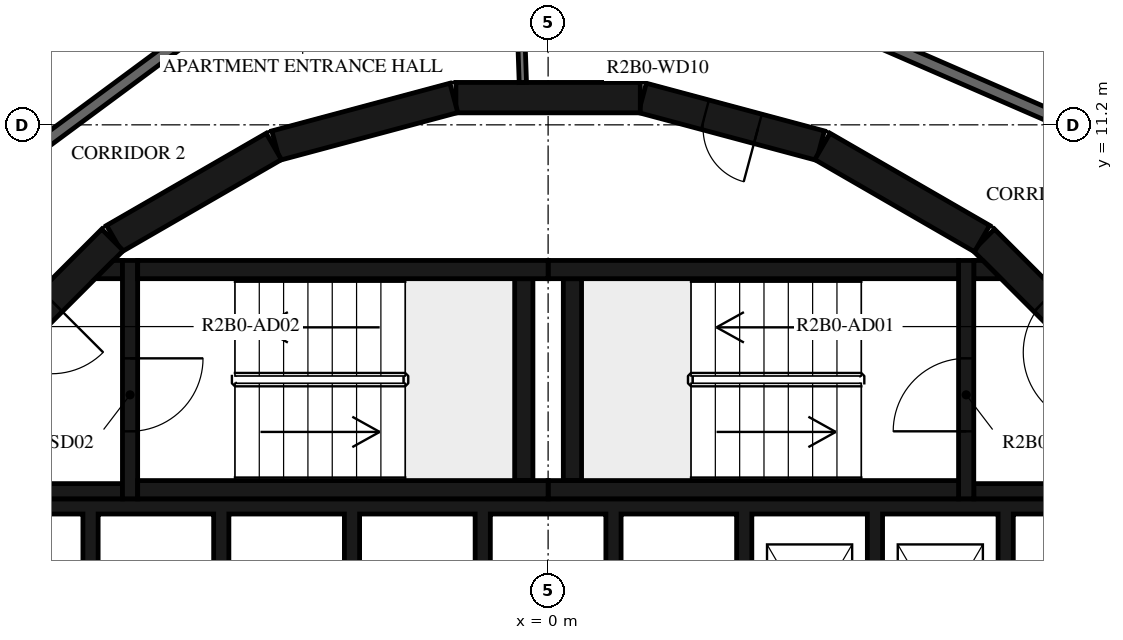
"""IFC4 building model, lengths in metres.
Left out: names, types, materials, properties, quantities, classifications, styles, units other than length and angle.
Written with IfcOpenShell. Run it as: python <this file> out.ifc"""

import sys

from ifc_helpers import new_model, si_unit, direction, frame, frame_2d, origin, place, context, subcontext, project, spatial, polyline, rectangle, outline, extrude, element, fill, save


model = new_model("IFC4")
c1 = context("Model", 3, precision=1e-05, world=origin(), true_north=direction((0.0, 1.0)))
c2 = subcontext(c1, "Body", "Model", "MODEL_VIEW")
j1 = project(units=[si_unit("LENGTHUNIT", "METRE"), si_unit("PLANEANGLEUNIT", "RADIAN")], contexts=[c1])
p1 = place(None, origin())
s1 = spatial("IfcSite", under=j1, at=p1, CompositionType="ELEMENT")
p2 = place(p1, origin())
s2 = spatial("IfcBuilding", under=s1, at=p2, CompositionType="ELEMENT")
p3 = place(p2, frame((0.0, 0.0, 90.7)))
s3 = spatial("IfcBuildingStorey", under=s2, at=p3, CompositionType="ELEMENT", Elevation=90.7)
p4 = place(p3, frame((9.308, 7.164, 0.0), z_axis=(0.0, 0.0, 1.0), x_axis=(-0.707106781187, 0.707106781187, 0.0)))
e1 = element("IfcWall", 1, at=p4, inside=s3, PredefinedType="SHEAR", context=c2, shape_type="SweptSolid", body=[
    extrude(rectangle(XDim=3.032, YDim=0.5, at=frame_2d((1.516, 0.0))), origin(), (0.0, 0.0, 1.0), 3.12),
])
p5 = place(p4, frame((0.416, 0.0, 0.0)))
e2 = element("IfcOpeningElement", 2, at=p5, cuts=e1, PredefinedType="OPENING", context=c2, shape_type="SweptSolid", body=[
    extrude(rectangle(XDim=1.2, YDim=2.1, at=frame_2d((0.6, 1.05))), frame((0.0, 0.26, 0.0), z_axis=(0.0, -1.0, 0.0), x_axis=(1.0, 0.0, 0.0)), (0.0, 0.0, 1.0), 0.52),
])
p6 = place(p3, frame((7.137, 9.329, 0.0), z_axis=(0.0, 0.0, 1.0), x_axis=(-0.865975092491, 0.500087131594, 0.0)))
e3 = element("IfcWall", 3, at=p6, inside=s3, PredefinedType="SHEAR", context=c2, shape_type="SweptSolid", body=[
    extrude(rectangle(XDim=3.033, YDim=0.5, at=frame_2d((1.516, 0.0))), origin(), (0.0, 0.0, 1.0), 3.12),
])
p7 = place(p3, frame((4.479, 10.858, 0.0), z_axis=(0.0, 0.0, 1.0), x_axis=(-0.965948410781, 0.258734743916, 0.0)))
e4 = element("IfcWall", 4, at=p7, inside=s3, PredefinedType="SHEAR", context=c2, shape_type="SweptSolid", body=[
    extrude(rectangle(XDim=3.033, YDim=0.5, at=frame_2d((1.516, 0.0))), origin(), (0.0, 0.0, 1.0), 3.12),
])
p8 = place(p7, frame((1.066, 0.0, 0.0)))
e5 = element("IfcOpeningElement", 5, at=p8, cuts=e4, PredefinedType="OPENING", context=c2, shape_type="SweptSolid", body=[
    extrude(rectangle(XDim=0.9, YDim=2.1, at=frame_2d((0.45, 1.05))), frame((0.0, 0.26, 0.0), z_axis=(0.0, -1.0, 0.0), x_axis=(1.0, 0.0, 0.0)), (0.0, 0.0, 1.0), 0.52),
])
for number, where, z_axis, x_axis in (
    (6, (1.516, 11.647, 0.0), (0.0, 0.0, 1.0), (-1.0, 0.0, 0.0)),
    (7, (-1.55, 11.643, 0.0), (0.0, 0.0, 1.0), (-0.966, -0.259, 0.0)),
    (8, (-4.51, 10.845, 0.0), (0.0, 0.0, 1.0), (-0.866, -0.5, 0.0)),
):
    element("IfcWall", number, at=place(p3, frame(where, z_axis=z_axis, x_axis=x_axis)), inside=s3, PredefinedType="SHEAR", context=c2, shape_type="SweptSolid", body=[
        extrude(rectangle(XDim=3.033, YDim=0.5, at=frame_2d((1.516, 0.0))), origin(), (0.0, 0.0, 1.0), 3.12),
    ])
p9 = place(p3, frame((-7.164, 9.308, 0.0), z_axis=(0.0, 0.0, 1.0), x_axis=(-0.707106781187, -0.707106781187, 0.0)))
e9 = element("IfcWall", 9, at=p9, inside=s3, PredefinedType="SHEAR", context=c2, shape_type="SweptSolid", body=[
    extrude(rectangle(XDim=3.032, YDim=0.5, at=frame_2d((1.516, 0.0))), origin(), (0.0, 0.0, 1.0), 3.12),
])
p10 = place(p9, frame((1.416, 0.0, 0.0)))
e10 = element("IfcOpeningElement", 10, at=p10, cuts=e9, PredefinedType="OPENING", context=c2, shape_type="SweptSolid", body=[
    extrude(rectangle(XDim=1.2, YDim=2.1, at=frame_2d((0.6, 1.05))), frame((0.0, 0.26, 0.0), z_axis=(0.0, -1.0, 0.0), x_axis=(1.0, 0.0, 0.0)), (0.0, 0.0, 1.0), 0.52),
])
for number, where, z_axis, x_axis in (
    (11, (0.0, 5.2, 0.0), (0.0, 0.0, 1.0), (1.0, 0.0, 0.0)),
    (12, (0.0, 8.82, 0.0), (0.0, 0.0, 1.0), (1.0, 0.0, 0.0)),
):
    element("IfcWall", number, at=place(p3, frame(where, z_axis=z_axis, x_axis=x_axis)), inside=s3, PredefinedType="SHEAR", context=c2, shape_type="SweptSolid", body=[
        extrude(rectangle(XDim=6.75, YDim=0.3, at=frame_2d((3.375, 0.0))), origin(), (0.0, 0.0, 1.0), 3.12),
    ])
p11 = place(p3, frame((0.4, 5.35, 0.0), z_axis=(0.0, 0.0, 1.0), x_axis=(0.0, 1.0, 0.0)))
e13 = element("IfcWall", 13, at=p11, inside=s3, PredefinedType="SHEAR", context=c2, shape_type="SweptSolid", body=[
    extrude(rectangle(XDim=3.32, YDim=0.3, at=frame_2d((1.66, 0.0))), origin(), (0.0, 0.0, 1.0), 3.12),
])
p12 = place(p3, frame((6.875, 5.05, 0.0), z_axis=(0.0, 0.0, 1.0), x_axis=(0.0, 1.0, 0.0)))
e14 = element("IfcWall", 14, at=p12, inside=s3, PredefinedType="SHEAR", context=c2, shape_type="SweptSolid", body=[
    extrude(rectangle(XDim=3.92, YDim=0.25, at=frame_2d((1.96, 0.0))), origin(), (0.0, 0.0, 1.0), 3.12),
])
p13 = place(p12, frame((1.11, 0.0, 0.0)))
e15 = element("IfcOpeningElement", 15, at=p13, cuts=e14, PredefinedType="OPENING", context=c2, shape_type="SweptSolid", body=[
    extrude(rectangle(XDim=1.2, YDim=2.1, at=frame_2d((0.6, 1.05))), frame((0.0, 0.135, 0.0), z_axis=(0.0, -1.0, 0.0), x_axis=(1.0, 0.0, 0.0)), (0.0, 0.0, 1.0), 0.27),
])
p14 = place(p3, frame((7.0, 5.175, 0.0), z_axis=(0.0, 0.0, 1.0), x_axis=(1.0, 0.0, 0.0)))
e16 = element("IfcWall", 16, at=p14, inside=s3, PredefinedType="SHEAR", context=c2, shape_type="SweptSolid", body=[
    extrude(rectangle(XDim=3.1, YDim=0.25, at=frame_2d((1.55, 0.0))), origin(), (0.0, 0.0, 1.0), 3.12),
])
p15 = place(p3, origin())
e17 = element("IfcWall", 17, at=p15, inside=s3, PredefinedType="SHEAR", context=c2, shape_type="SweptSolid", body=[
    extrude(outline(polyline([(7.448, 8.67), (7.0, 8.67), (7.0, 8.97), (7.148, 8.97), (7.448, 8.67)])), origin(), (0.0, 0.0, 1.0), 3.12),
])
for number, where, z_axis, x_axis in (
    (18, (-6.75, 5.2, 0.0), (0.0, 0.0, 1.0), (1.0, 0.0, 0.0)),
    (19, (-6.75, 8.82, 0.0), (0.0, 0.0, 1.0), (1.0, 0.0, 0.0)),
):
    element("IfcWall", number, at=place(p3, frame(where, z_axis=z_axis, x_axis=x_axis)), inside=s3, PredefinedType="SHEAR", context=c2, shape_type="SweptSolid", body=[
        extrude(rectangle(XDim=6.75, YDim=0.3, at=frame_2d((3.375, 0.0))), origin(), (0.0, 0.0, 1.0), 3.12),
    ])
p16 = place(p3, frame((-0.4, 5.35, 0.0), z_axis=(0.0, 0.0, 1.0), x_axis=(0.0, 1.0, 0.0)))
e20 = element("IfcWall", 20, at=p16, inside=s3, PredefinedType="SHEAR", context=c2, shape_type="SweptSolid", body=[
    extrude(rectangle(XDim=3.32, YDim=0.3, at=frame_2d((1.66, 0.0))), origin(), (0.0, 0.0, 1.0), 3.12),
])
p17 = place(p3, frame((-6.875, 8.97, 0.0), z_axis=(0.0, 0.0, 1.0), x_axis=(0.0, -1.0, 0.0)))
e21 = element("IfcWall", 21, at=p17, inside=s3, PredefinedType="SHEAR", context=c2, shape_type="SweptSolid", body=[
    extrude(rectangle(XDim=3.92, YDim=0.25, at=frame_2d((1.96, 0.0))), origin(), (0.0, 0.0, 1.0), 3.12),
])
p18 = place(p17, frame((1.61, 0.0, 0.0)))
e22 = element("IfcOpeningElement", 22, at=p18, cuts=e21, PredefinedType="OPENING", context=c2, shape_type="SweptSolid", body=[
    extrude(rectangle(XDim=1.2, YDim=2.1, at=frame_2d((0.6, 1.05))), frame((0.0, 0.135, 0.0), z_axis=(0.0, -1.0, 0.0), x_axis=(1.0, 0.0, 0.0)), (0.0, 0.0, 1.0), 0.27),
])
p19 = place(p3, frame((-7.0, 5.175, 0.0), z_axis=(0.0, 0.0, 1.0), x_axis=(-1.0, 0.0, 0.0)))
e23 = element("IfcWall", 23, at=p19, inside=s3, PredefinedType="SHEAR", context=c2, shape_type="SweptSolid", body=[
    extrude(rectangle(XDim=3.1, YDim=0.25, at=frame_2d((1.55, 0.0))), origin(), (0.0, 0.0, 1.0), 3.12),
])
p20 = place(p3, origin())
e24 = element("IfcWall", 24, at=p20, inside=s3, PredefinedType="SHEAR", context=c2, shape_type="SweptSolid", body=[
    extrude(outline(polyline([(-7.148, 8.97), (-7.0, 8.97), (-7.0, 8.67), (-7.448, 8.67), (-7.148, 8.97)])), origin(), (0.0, 0.0, 1.0), 3.12),
])
p21 = place(p3, origin())
e25 = element("IfcWall", 25, at=p21, inside=s3, PredefinedType="SHEAR", context=c2, shape_type="SweptSolid", body=[
    extrude(outline(polyline([(-9.55, 4.8), (-7.65, 4.8), (-7.65, 1.9), (-7.4, 1.9), (-7.4, 4.8), (-5.5, 4.8), (-5.5, 1.9), (-5.25, 1.9), (-5.25, 4.8), (-3.35, 4.8), (-3.35, 1.9), (-3.1, 1.9), (-3.1, 4.8), (-1.2, 4.8), (-1.2, 1.9), (-0.95, 1.9), (-0.95, 4.8), (0.95, 4.8), (0.95, 1.9), (1.2, 1.9), (1.2, 4.8), (3.1, 4.8), (3.1, 1.9), (3.35, 1.9), (3.35, 4.8), (5.25, 4.8), (5.25, 1.9), (5.5, 1.9), (5.5, 4.8), (7.4, 4.8), (7.4, 1.9), (7.65, 1.9), (7.65, 4.8), (9.55, 4.8), (9.55, 1.9), (9.8, 1.9), (9.8, 4.8), (9.8, 5.05), (-9.8, 5.05), (-9.8, 4.8), (-9.8, 1.9), (-9.55, 1.9), (-9.55, 4.8)])), origin(), (0.0, 0.0, 1.0), 3.12),
])
p22 = place(p3, frame((-0.479, 13.734, 0.0), z_axis=(0.0, 0.0, 1.0), x_axis=(0.034805430832, -0.999394107439, 0.0)))
e26 = element("IfcWall", 26, at=p22, inside=s3, PredefinedType="PARTITIONING", context=c2, shape_type="SweptSolid", body=[
    extrude(rectangle(XDim=1.838, YDim=0.12, at=frame_2d((0.919, 0.0))), origin(), (0.0, 0.0, 1.0), 3.12),
])
p23 = place(p22, frame((0.115, 0.0, 0.0)))
e27 = element("IfcOpeningElement", 27, at=p23, cuts=e26, PredefinedType="OPENING", context=c2, shape_type="SweptSolid", body=[
    extrude(rectangle(XDim=1.2, YDim=2.1, at=frame_2d((0.6, 1.05))), frame((0.0, 0.07, 0.0), z_axis=(0.0, -1.0, 0.0), x_axis=(1.0, 0.0, 0.0)), (0.0, 0.0, 1.0), 0.14),
])
p24 = place(p3, frame((8.829, 11.1, 0.0), z_axis=(0.0, 0.0, 1.0), x_axis=(-0.917063183388, 0.398741918631, 0.0)))
e28 = element("IfcWall", 28, at=p24, inside=s3, PredefinedType="STANDARD", context=c2, shape_type="SweptSolid", body=[
    extrude(rectangle(XDim=7.342, YDim=0.2, at=frame_2d((3.671, 0.0))), origin(), (0.0, 0.0, 1.0), 3.12),
])
p25 = place(p3, frame((-5.198, 13.196, 0.0), z_axis=(0.0, 0.0, 1.0), x_axis=(-0.803864151363, -0.594812933748, 0.0)))
e29 = element("IfcWall", 29, at=p25, inside=s3, PredefinedType="STANDARD", context=c2, shape_type="SweptSolid", body=[
    extrude(rectangle(XDim=7.24, YDim=0.2, at=frame_2d((3.62, 0.0))), origin(), (0.0, 0.0, 1.0), 3.12),
])
p26 = place(p25, frame((5.7, 0.0, 0.0)))
e30 = element("IfcOpeningElement", 30, at=p26, cuts=e29, PredefinedType="OPENING", context=c2, shape_type="SweptSolid", body=[
    extrude(rectangle(XDim=1.0, YDim=2.1, at=frame_2d((0.5, 1.05))), frame((0.0, 0.11, 0.0), z_axis=(0.0, -1.0, 0.0), x_axis=(1.0, 0.0, 0.0)), (0.0, 0.0, 1.0), 0.22),
])
p27 = place(p3, frame((9.796, 12.315, 0.0), z_axis=(0.0, 0.0, 1.0), x_axis=(-0.917053660722, 0.398763819017, 0.0)))
e31 = element("IfcWall", 31, at=p27, inside=s3, PredefinedType="PARTITIONING", context=c2, shape_type="SweptSolid", body=[
    extrude(rectangle(XDim=7.576, YDim=0.12, at=frame_2d((3.788, 0.0))), origin(), (0.0, 0.0, 1.0), 3.12),
])
p28 = place(p27, frame((2.185, 0.0, 0.0)))
e32 = element("IfcOpeningElement", 32, at=p28, cuts=e31, PredefinedType="OPENING", context=c2, shape_type="SweptSolid", body=[
    extrude(rectangle(XDim=0.8, YDim=2.1, at=frame_2d((0.4, 1.05))), frame((0.0, 0.07, 0.0), z_axis=(0.0, -1.0, 0.0), x_axis=(1.0, 0.0, 0.0)), (0.0, 0.0, 1.0), 0.14),
])
p29 = place(p3, frame((-5.767, 14.641, 0.0), z_axis=(0.0, 0.0, 1.0), x_axis=(-0.803853364238, -0.594827511807, 0.0)))
e33 = element("IfcWall", 33, at=p29, inside=s3, PredefinedType="PARTITIONING", context=c2, shape_type="SweptSolid", body=[
    extrude(rectangle(XDim=8.146, YDim=0.12, at=frame_2d((4.073, 0.0))), origin(), (0.0, 0.0, 1.0), 3.12),
])
p30 = place(p29, frame((0.97, 0.0, 0.0)))
e34 = element("IfcOpeningElement", 34, at=p30, cuts=e33, PredefinedType="OPENING", context=c2, shape_type="SweptSolid", body=[
    extrude(rectangle(XDim=0.8, YDim=2.1, at=frame_2d((0.4, 1.05))), frame((0.0, 0.07, 0.0), z_axis=(0.0, -1.0, 0.0), x_axis=(1.0, 0.0, 0.0)), (0.0, 0.0, 1.0), 0.14),
])
p31 = place(p3, frame((-5.952, 23.571, 0.0), z_axis=(0.0, 0.0, 1.0), x_axis=(-0.398745097158, -0.917061801348, 0.0)))
e35 = element("IfcWall", 35, at=p31, inside=s3, PredefinedType="PARTITIONING", context=c2, shape_type="SweptSolid", body=[
    extrude(rectangle(XDim=14.576, YDim=0.12, at=frame_2d((7.288, 0.0))), origin(), (0.0, 0.0, 1.0), 3.12),
])
p32 = place(p31, frame((3.201, 0.0, 0.0)))
e36 = element("IfcOpeningElement", 36, at=p32, cuts=e35, PredefinedType="OPENING", context=c2, shape_type="SweptSolid", body=[
    extrude(rectangle(XDim=0.9, YDim=2.1, at=frame_2d((0.45, 1.05))), frame((0.0, 0.07, 0.0), z_axis=(0.0, -1.0, 0.0), x_axis=(1.0, 0.0, 0.0)), (0.0, 0.0, 1.0), 0.14),
])
p33 = place(p31, frame((0.2, 0.0, 0.0)))
e37 = element("IfcOpeningElement", 37, at=p33, cuts=e35, PredefinedType="OPENING", context=c2, shape_type="SweptSolid", body=[
    extrude(rectangle(XDim=0.9, YDim=2.1, at=frame_2d((0.45, 1.05))), frame((0.0, 0.07, 0.0), z_axis=(0.0, -1.0, 0.0), x_axis=(1.0, 0.0, 0.0)), (0.0, 0.0, 1.0), 0.14),
])
p34 = place(p13, origin())
e38 = element("IfcDoor", 38, at=p34, inside=s3, OperationType="SINGLE_SWING_LEFT", PredefinedType="DOOR", context=c2, shape_type="SweptSolid", body=[
    extrude(rectangle(XDim=1.2, YDim=2.1, at=frame_2d((0.6, 1.05))), frame((0.0, 0.025, 0.0), z_axis=(0.0, -1.0, 0.0), x_axis=(1.0, 0.0, 0.0)), (0.0, 0.0, 1.0), 0.05),
])
fill(e15, e38)
p35 = place(p5, origin())
e39 = element("IfcDoor", 39, at=p35, inside=s3, OperationType="SINGLE_SWING_RIGHT", PredefinedType="DOOR", context=c2, shape_type="SweptSolid", body=[
    extrude(rectangle(XDim=1.2, YDim=2.1, at=frame_2d((0.6, 1.05))), frame((0.0, 0.025, 0.0), z_axis=(0.0, -1.0, 0.0), x_axis=(1.0, 0.0, 0.0)), (0.0, 0.0, 1.0), 0.05),
])
fill(e2, e39)
p36 = place(p18, origin())
e40 = element("IfcDoor", 40, at=p36, inside=s3, OperationType="SINGLE_SWING_LEFT", PredefinedType="DOOR", context=c2, shape_type="SweptSolid", body=[
    extrude(rectangle(XDim=1.2, YDim=2.1, at=frame_2d((0.6, 1.05))), frame((0.0, 0.025, 0.0), z_axis=(0.0, -1.0, 0.0), x_axis=(1.0, 0.0, 0.0)), (0.0, 0.0, 1.0), 0.05),
])
fill(e22, e40)
p37 = place(p10, origin())
e41 = element("IfcDoor", 41, at=p37, inside=s3, OperationType="SINGLE_SWING_RIGHT", PredefinedType="DOOR", context=c2, shape_type="SweptSolid", body=[
    extrude(rectangle(XDim=1.2, YDim=2.1, at=frame_2d((0.6, 1.05))), frame((0.0, 0.025, 0.0), z_axis=(0.0, -1.0, 0.0), x_axis=(1.0, 0.0, 0.0)), (0.0, 0.0, 1.0), 0.05),
])
fill(e10, e41)
p38 = place(p8, origin())
e42 = element("IfcDoor", 42, at=p38, inside=s3, OperationType="SINGLE_SWING_LEFT", PredefinedType="DOOR", context=c2, shape_type="SweptSolid", body=[
    extrude(rectangle(XDim=0.9, YDim=2.1, at=frame_2d((0.45, 1.05))), frame((0.0, 0.025, 0.0), z_axis=(0.0, -1.0, 0.0), x_axis=(1.0, 0.0, 0.0)), (0.0, 0.0, 1.0), 0.05),
])
fill(e5, e42)
save(model, sys.argv[1])
